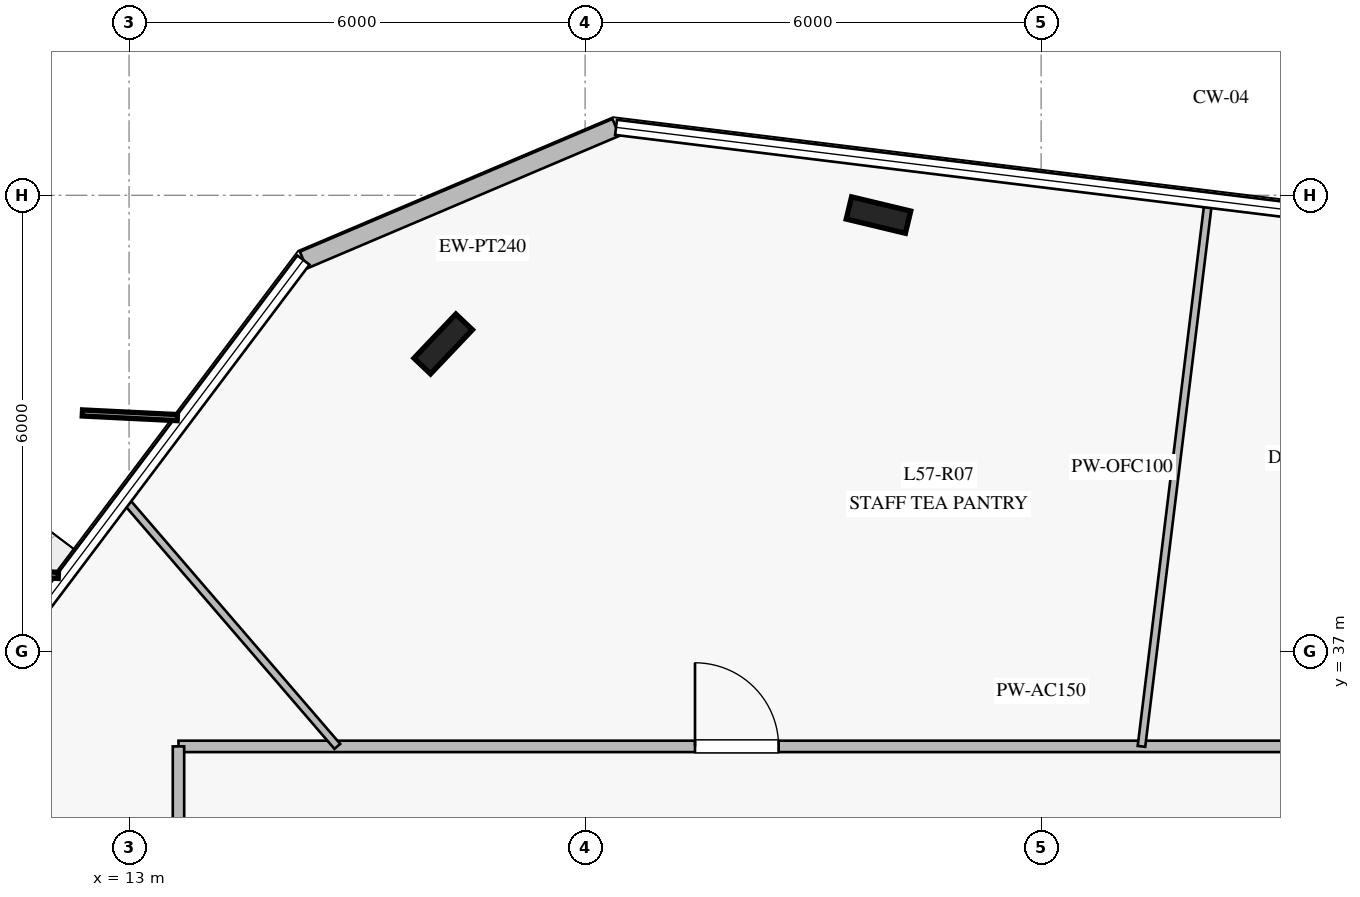
"""IFC4 building model, lengths in metres.
Left out: names, types, materials, properties, quantities, classifications, styles, units other than length and angle.
Written with IfcOpenShell. Run it as: python <this file> out.ifc"""

import sys

from ifc_helpers import new_model, si_unit, direction, frame, frame_2d, origin, origin_2d, place, context, subcontext, project, spatial, rectangle, i_section, extrude, element, fill, save


model = new_model("IFC4")
c1 = context("Model", 3, precision=1e-05, world=origin(), true_north=direction((0.0, 1.0)))
c2 = subcontext(c1, "Body", "Model", "MODEL_VIEW")
j1 = project(units=[si_unit("LENGTHUNIT", "METRE"), si_unit("PLANEANGLEUNIT", "RADIAN")], contexts=[c1])
p1 = place(None, origin())
s1 = spatial("IfcSite", under=j1, at=p1, CompositionType="ELEMENT")
p2 = place(p1, origin())
s2 = spatial("IfcBuilding", under=s1, at=p2, CompositionType="ELEMENT")
p3 = place(p2, frame((0.0, 0.0, 236.8)))
s3 = spatial("IfcBuildingStorey", under=s2, at=p3, CompositionType="ELEMENT", Elevation=236.8)
for number, where, z_axis, x_axis in (
    (1, (22.86, 42.74, 0.0), (0.0, 0.0, 1.0), (-0.972, 0.233, 0.0)),
    (2, (17.133, 41.044, 0.0), (0.0, 0.0, 1.0), (0.688, 0.725, 0.0)),
):
    element("IfcColumn", number, at=place(p3, frame(where, z_axis=z_axis, x_axis=x_axis)), inside=s3, PredefinedType="COLUMN", context=c2, shape_type="SweptSolid", body=[
        extrude(i_section(OverallWidth=0.3, OverallDepth=0.8, WebThickness=0.018, FlangeThickness=0.033, at=origin_2d()), origin(), (0.0, 0.0, 1.0), 4.0),
    ])
p4 = place(p3, frame((19.407, 43.894, 0.0), z_axis=(0.0, 0.0, 1.0), x_axis=(-0.92048770115, -0.390771534316, 0.0)))
e3 = element("IfcWall", 3, at=p4, inside=s3, PredefinedType="STANDARD", context=c2, shape_type="SweptSolid", body=[
    extrude(rectangle(XDim=4.468, YDim=0.24, at=frame_2d((2.234, 0.0))), origin(), (0.0, 0.0, 1.0), 3.78),
])
p5 = place(p3, frame((13.65, 35.75, 0.0), z_axis=(0.0, 0.0, 1.0), x_axis=(1.0, 0.0, 0.0)))
e4 = element("IfcWall", 4, at=p5, inside=s3, PredefinedType="PARTITIONING", context=c2, shape_type="SweptSolid", body=[
    extrude(rectangle(XDim=22.7, YDim=0.15, at=frame_2d((11.35, 0.0))), origin(), (0.0, 0.0, 1.0), 3.05),
])
p6 = place(p5, frame((16.956, 0.0, 0.0)))
e5 = element("IfcOpeningElement", 5, at=p6, cuts=e4, PredefinedType="OPENING", context=c2, shape_type="SweptSolid", body=[
    extrude(rectangle(XDim=1.1, YDim=2.2, at=frame_2d((0.55, 1.1))), frame((0.0, 0.085, 0.0), z_axis=(0.0, -1.0, 0.0), x_axis=(1.0, 0.0, 0.0)), (0.0, 0.0, 1.0), 0.17),
])
p7 = place(p5, frame((6.796, 0.0, 0.0)))
e6 = element("IfcOpeningElement", 6, at=p7, cuts=e4, PredefinedType="OPENING", context=c2, shape_type="SweptSolid", body=[
    extrude(rectangle(XDim=1.1, YDim=2.2, at=frame_2d((0.55, 1.1))), frame((0.0, 0.085, 0.0), z_axis=(0.0, -1.0, 0.0), x_axis=(1.0, 0.0, 0.0)), (0.0, 0.0, 1.0), 0.17),
])
p8 = place(p3, frame((13.65, 14.25, 0.0), z_axis=(0.0, 0.0, 1.0), x_axis=(0.0, 1.0, 0.0)))
e7 = element("IfcWall", 7, at=p8, inside=s3, PredefinedType="PARTITIONING", context=c2, shape_type="SweptSolid", body=[
    extrude(rectangle(XDim=21.5, YDim=0.15, at=frame_2d((10.75, 0.0))), origin(), (0.0, 0.0, 1.0), 3.28),
])
p9 = place(p8, frame((4.968, 0.0, 0.0)))
e8 = element("IfcOpeningElement", 8, at=p9, cuts=e7, PredefinedType="OPENING", context=c2, shape_type="SweptSolid", body=[
    extrude(rectangle(XDim=1.1, YDim=2.2, at=frame_2d((0.55, 1.1))), frame((0.0, 0.085, 0.0), z_axis=(0.0, -1.0, 0.0), x_axis=(1.0, 0.0, 0.0)), (0.0, 0.0, 1.0), 0.17),
])
p10 = place(p8, frame((15.44, 0.0, 0.0)))
e9 = element("IfcOpeningElement", 9, at=p10, cuts=e7, PredefinedType="OPENING", context=c2, shape_type="SweptSolid", body=[
    extrude(rectangle(XDim=1.1, YDim=2.2, at=frame_2d((0.55, 1.1))), frame((0.0, 0.085, 0.0), z_axis=(0.0, -1.0, 0.0), x_axis=(1.0, 0.0, 0.0)), (0.0, 0.0, 1.0), 0.17),
])
p11 = place(p3, frame((26.32, 35.75, 0.0), z_axis=(0.0, 0.0, 1.0), x_axis=(0.121804850919, 0.992554068196, 0.0)))
e10 = element("IfcWall", 10, at=p11, inside=s3, PredefinedType="MOVABLE", context=c2, shape_type="SweptSolid", body=[
    extrude(rectangle(XDim=7.224, YDim=0.1, at=frame_2d((3.612, 0.0))), origin(), (0.0, 0.0, 1.0), 3.05),
])
p12 = place(p3, frame((15.74, 35.75, 0.0), z_axis=(0.0, 0.0, 1.0), x_axis=(-0.652566727063, 0.75773126287, 0.0)))
e11 = element("IfcWall", 11, at=p12, inside=s3, PredefinedType="MOVABLE", context=c2, shape_type="SweptSolid", body=[
    extrude(rectangle(XDim=4.288, YDim=0.1, at=frame_2d((2.144, 0.0))), origin(), (0.0, 0.0, 1.0), 3.18),
])
p13 = place(p7, origin())
e12 = element("IfcDoor", 12, at=p13, inside=s3, OperationType="SINGLE_SWING_LEFT", PredefinedType="DOOR", context=c2, shape_type="SweptSolid", body=[
    extrude(rectangle(XDim=1.1, YDim=2.2, at=frame_2d((0.55, 1.1))), frame((0.0, 0.025, 0.0), z_axis=(0.0, -1.0, 0.0), x_axis=(1.0, 0.0, 0.0)), (0.0, 0.0, 1.0), 0.05),
])
fill(e6, e12)
save(model, sys.argv[1])
